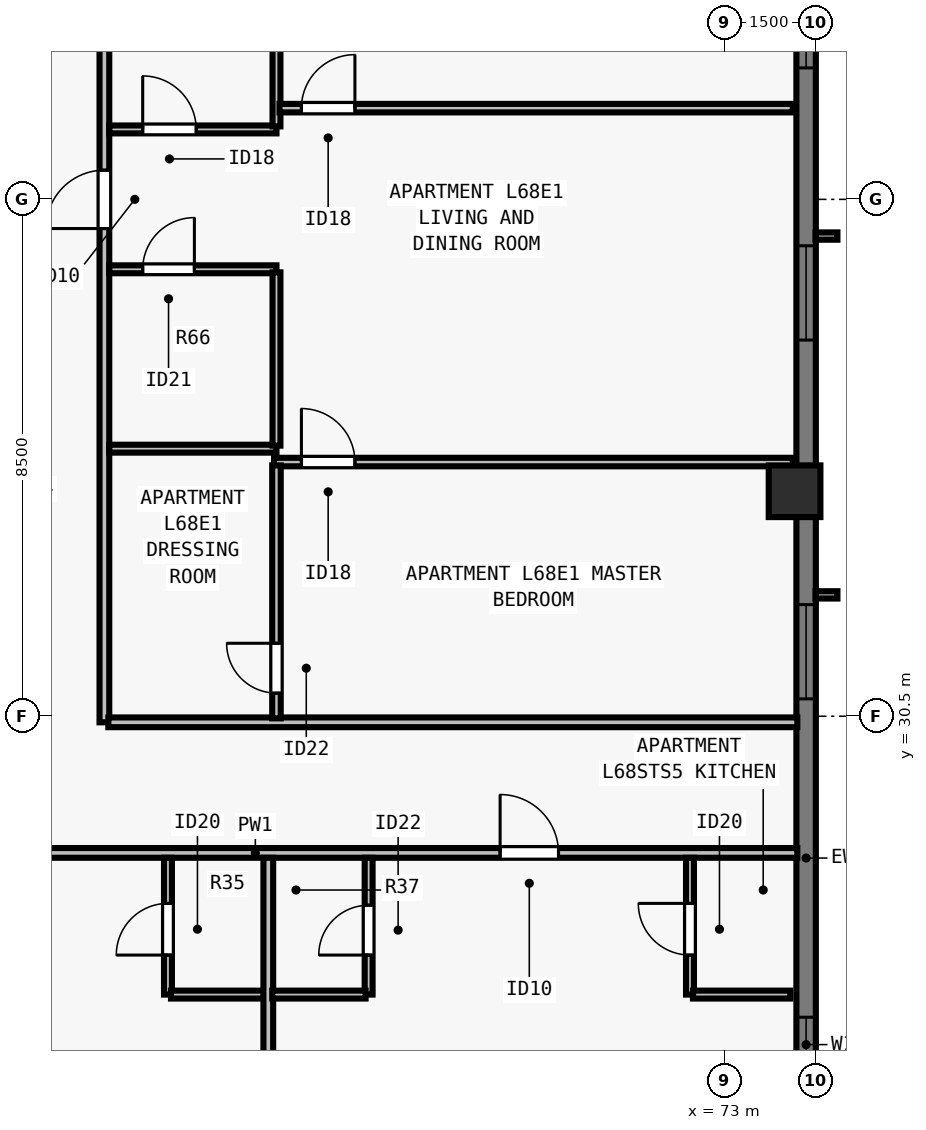
"""IFC4 building model, lengths in metres.
Left out: names, types, materials, properties, quantities, classifications, styles, units other than length and angle.
Written with IfcOpenShell. Run it as: python <this file> out.ifc"""

import sys

from ifc_helpers import new_model, si_unit, direction, frame, frame_2d, origin, origin_2d, place, context, subcontext, project, spatial, rectangle, extrude, element, fill, save


model = new_model("IFC4")
c1 = context("Model", 3, precision=1e-05, world=origin(), true_north=direction((0.0, 1.0)))
c2 = subcontext(c1, "Body", "Model", "MODEL_VIEW")
j1 = project(units=[si_unit("LENGTHUNIT", "METRE"), si_unit("PLANEANGLEUNIT", "RADIAN")], contexts=[c1])
p1 = place(None, origin())
s1 = spatial("IfcSite", under=j1, at=p1, CompositionType="ELEMENT")
p2 = place(p1, origin())
s2 = spatial("IfcBuilding", under=s1, at=p2, CompositionType="ELEMENT")
p3 = place(p2, frame((0.0, 0.0, 248.0)))
s3 = spatial("IfcBuildingStorey", under=s2, at=p3, CompositionType="ELEMENT", Elevation=248.0)
p4 = place(p3, frame((74.15, 34.2, 0.0), z_axis=(0.0, 0.0, 1.0), x_axis=(0.0, 1.0, 0.0)))
e1 = element("IfcColumn", 1, at=p4, inside=s3, PredefinedType="COLUMN", context=c2, shape_type="SweptSolid", body=[
    extrude(rectangle(XDim=0.85, YDim=0.85, at=origin_2d()), origin(), (0.0, 0.0, 1.0), 3.5),
])
p5 = place(p3, frame((74.34, 56.5, 0.0), z_axis=(0.0, 0.0, 1.0), x_axis=(0.0, -1.0, 0.0)))
e2 = element("IfcWall", 2, at=p5, inside=s3, PredefinedType="SOLIDWALL", context=c2, shape_type="SweptSolid", body=[
    extrude(rectangle(XDim=34.702, YDim=0.32, at=frame_2d((17.351, 0.0))), origin(), (0.0, 0.0, 1.0), 3.29),
])
p6 = place(p5, frame((4.763, 0.0, 0.8)))
e3 = element("IfcOpeningElement", 3, at=p6, cuts=e2, PredefinedType="OPENING", context=c2, shape_type="SweptSolid", body=[
    extrude(rectangle(XDim=1.55, YDim=1.678, at=frame_2d((0.775, 0.839))), frame((0.0, 0.17, 0.0), z_axis=(0.0, -1.0, 0.0), x_axis=(1.0, 0.0, 0.0)), (0.0, 0.0, 1.0), 0.34),
])
p7 = place(p5, frame((9.238, 0.0, 0.8)))
e4 = element("IfcOpeningElement", 4, at=p7, cuts=e2, PredefinedType="OPENING", context=c2, shape_type="SweptSolid", body=[
    extrude(rectangle(XDim=1.85, YDim=1.678, at=frame_2d((0.925, 0.839))), frame((0.0, 0.17, 0.0), z_axis=(0.0, -1.0, 0.0), x_axis=(1.0, 0.0, 0.0)), (0.0, 0.0, 1.0), 0.34),
])
p8 = place(p5, frame((13.488, 0.0, 0.8)))
e5 = element("IfcOpeningElement", 5, at=p8, cuts=e2, PredefinedType="OPENING", context=c2, shape_type="SweptSolid", body=[
    extrude(rectangle(XDim=1.85, YDim=1.678, at=frame_2d((0.925, 0.839))), frame((0.0, 0.17, 0.0), z_axis=(0.0, -1.0, 0.0), x_axis=(1.0, 0.0, 0.0)), (0.0, 0.0, 1.0), 0.34),
])
p9 = place(p5, frame((18.264, 0.0, 0.8)))
e6 = element("IfcOpeningElement", 6, at=p9, cuts=e2, PredefinedType="OPENING", context=c2, shape_type="SweptSolid", body=[
    extrude(rectangle(XDim=1.55, YDim=1.678, at=frame_2d((0.775, 0.839))), frame((0.0, 0.17, 0.0), z_axis=(0.0, -1.0, 0.0), x_axis=(1.0, 0.0, 0.0)), (0.0, 0.0, 1.0), 0.34),
])
p10 = place(p5, frame((24.164, 0.0, 0.8)))
e7 = element("IfcOpeningElement", 7, at=p10, cuts=e2, PredefinedType="OPENING", context=c2, shape_type="SweptSolid", body=[
    extrude(rectangle(XDim=1.55, YDim=1.678, at=frame_2d((0.775, 0.839))), frame((0.0, 0.17, 0.0), z_axis=(0.0, -1.0, 0.0), x_axis=(1.0, 0.0, 0.0)), (0.0, 0.0, 1.0), 0.34),
])
p11 = place(p5, frame((30.95, 0.0, 0.8)))
e8 = element("IfcOpeningElement", 8, at=p11, cuts=e2, PredefinedType="OPENING", context=c2, shape_type="SweptSolid", body=[
    extrude(rectangle(XDim=0.9, YDim=1.678, at=frame_2d((0.45, 0.839))), frame((0.0, 0.17, 0.0), z_axis=(0.0, -1.0, 0.0), x_axis=(1.0, 0.0, 0.0)), (0.0, 0.0, 1.0), 0.34),
])
p12 = place(p3, frame((29.915, 28.252, 0.0), z_axis=(0.0, 0.0, 1.0), x_axis=(1.0, 0.0, 0.0)))
e9 = element("IfcWall", 9, at=p12, inside=s3, PredefinedType="PARTITIONING", context=c2, shape_type="SweptSolid", body=[
    extrude(rectangle(XDim=44.28, YDim=0.16, at=frame_2d((22.14, 0.0))), origin(), (0.0, 0.0, 1.0), 2.958),
])
p13 = place(p12, frame((5.002, 0.0, 0.0)))
e10 = element("IfcOpeningElement", 10, at=p13, cuts=e9, PredefinedType="OPENING", context=c2, shape_type="SweptSolid", body=[
    extrude(rectangle(XDim=0.96, YDim=2.18, at=frame_2d((0.48, 1.09))), frame((0.0, 0.09, 0.0), z_axis=(0.0, -1.0, 0.0), x_axis=(1.0, 0.0, 0.0)), (0.0, 0.0, 1.0), 0.18),
])
p14 = place(p12, frame((12.718, 0.0, 0.0)))
e11 = element("IfcOpeningElement", 11, at=p14, cuts=e9, PredefinedType="OPENING", context=c2, shape_type="SweptSolid", body=[
    extrude(rectangle(XDim=0.96, YDim=2.18, at=frame_2d((0.48, 1.09))), frame((0.0, 0.09, 0.0), z_axis=(0.0, -1.0, 0.0), x_axis=(1.0, 0.0, 0.0)), (0.0, 0.0, 1.0), 0.18),
])
p15 = place(p12, frame((21.55, 0.0, 0.0)))
e12 = element("IfcOpeningElement", 12, at=p15, cuts=e9, PredefinedType="OPENING", context=c2, shape_type="SweptSolid", body=[
    extrude(rectangle(XDim=0.96, YDim=2.18, at=frame_2d((0.48, 1.09))), frame((0.0, 0.09, 0.0), z_axis=(0.0, -1.0, 0.0), x_axis=(1.0, 0.0, 0.0)), (0.0, 0.0, 1.0), 0.18),
])
p16 = place(p12, frame((30.382, 0.0, 0.0)))
e13 = element("IfcOpeningElement", 13, at=p16, cuts=e9, PredefinedType="OPENING", context=c2, shape_type="SweptSolid", body=[
    extrude(rectangle(XDim=0.96, YDim=2.18, at=frame_2d((0.48, 1.09))), frame((0.0, 0.09, 0.0), z_axis=(0.0, -1.0, 0.0), x_axis=(1.0, 0.0, 0.0)), (0.0, 0.0, 1.0), 0.18),
])
p17 = place(p12, frame((39.393, 0.0, 0.0)))
e14 = element("IfcOpeningElement", 14, at=p17, cuts=e9, PredefinedType="OPENING", context=c2, shape_type="SweptSolid", body=[
    extrude(rectangle(XDim=0.96, YDim=2.18, at=frame_2d((0.48, 1.09))), frame((0.0, 0.09, 0.0), z_axis=(0.0, -1.0, 0.0), x_axis=(1.0, 0.0, 0.0)), (0.0, 0.0, 1.0), 0.18),
])
p18 = place(p3, frame((62.8, 30.4, 0.0), z_axis=(0.0, 0.0, 1.0), x_axis=(0.0, 1.0, 0.0)))
e15 = element("IfcWall", 15, at=p18, inside=s3, PredefinedType="PARTITIONING", context=c2, shape_type="SweptSolid", body=[
    extrude(rectangle(XDim=17.2, YDim=0.16, at=frame_2d((8.6, 0.0))), origin(), (0.0, 0.0, 1.0), 3.29),
])
p19 = place(p18, frame((8.12, 0.0, 0.0)))
e16 = element("IfcOpeningElement", 16, at=p19, cuts=e15, PredefinedType="OPENING", context=c2, shape_type="SweptSolid", body=[
    extrude(rectangle(XDim=0.96, YDim=2.18, at=frame_2d((0.48, 1.09))), frame((0.0, 0.09, 0.0), z_axis=(0.0, -1.0, 0.0), x_axis=(1.0, 0.0, 0.0)), (0.0, 0.0, 1.0), 0.18),
])
p20 = place(p3, frame((62.865, 30.4, 0.0), z_axis=(0.0, 0.0, 1.0), x_axis=(1.0, 0.0, 0.0)))
e17 = element("IfcWall", 17, at=p20, inside=s3, PredefinedType="PARTITIONING", context=c2, shape_type="SweptSolid", body=[
    extrude(rectangle(XDim=11.33, YDim=0.16, at=frame_2d((5.665, 0.0))), origin(), (0.0, 0.0, 1.0), 3.29),
])
p21 = place(p3, frame((63.845, 25.923, 0.0), z_axis=(0.0, 0.0, 1.0), x_axis=(0.0, 1.0, 0.0)))
e18 = element("IfcWall", 18, at=p21, inside=s3, PredefinedType="PLUMBINGWALL", context=c2, shape_type="SweptSolid", body=[
    extrude(rectangle(XDim=2.25, YDim=0.13, at=frame_2d((1.125, 0.0))), origin(), (0.0, 0.0, 1.0), 3.29),
])
p22 = place(p21, frame((0.65, 0.0, 0.0)))
e19 = element("IfcOpeningElement", 19, at=p22, cuts=e18, PredefinedType="OPENING", context=c2, shape_type="SweptSolid", body=[
    extrude(rectangle(XDim=0.85, YDim=2.1, at=frame_2d((0.425, 1.05))), frame((0.0, 0.075, 0.0), z_axis=(0.0, -1.0, 0.0), x_axis=(1.0, 0.0, 0.0)), (0.0, 0.0, 1.0), 0.15),
])
p23 = place(p3, frame((63.896, 25.923, 0.0), z_axis=(0.0, 0.0, 1.0), x_axis=(1.0, 0.0, 0.0)))
e20 = element("IfcWall", 20, at=p23, inside=s3, PredefinedType="PLUMBINGWALL", context=c2, shape_type="SweptSolid", body=[
    extrude(rectangle(XDim=1.6, YDim=0.13, at=frame_2d((0.8, 0.0))), origin(), (0.0, 0.0, 1.0), 3.29),
])
p24 = place(p3, frame((65.496, 16.805, 0.0), z_axis=(0.0, 0.0, 1.0), x_axis=(0.0, 1.0, 0.0)))
e21 = element("IfcWall", 21, at=p24, inside=s3, PredefinedType="PARTITIONING", context=c2, shape_type="SweptSolid", body=[
    extrude(rectangle(XDim=11.368, YDim=0.16, at=frame_2d((5.684, 0.0))), origin(), (0.0, 0.0, 1.0), 2.573),
])
p25 = place(p3, frame((67.146, 25.923, 0.0), z_axis=(0.0, 0.0, 1.0), x_axis=(0.0, 1.0, 0.0)))
e22 = element("IfcWall", 22, at=p25, inside=s3, PredefinedType="PLUMBINGWALL", context=c2, shape_type="SweptSolid", body=[
    extrude(rectangle(XDim=2.25, YDim=0.13, at=frame_2d((1.125, 0.0))), origin(), (0.0, 0.0, 1.0), 3.29),
])
p26 = place(p25, frame((0.65, 0.0, 0.0)))
e23 = element("IfcOpeningElement", 23, at=p26, cuts=e22, PredefinedType="OPENING", context=c2, shape_type="SweptSolid", body=[
    extrude(rectangle(XDim=0.82, YDim=2.1, at=frame_2d((0.41, 1.05))), frame((0.0, 0.075, 0.0), z_axis=(0.0, -1.0, 0.0), x_axis=(1.0, 0.0, 0.0)), (0.0, 0.0, 1.0), 0.15),
])
p27 = place(p3, frame((65.561, 25.923, 0.0), z_axis=(0.0, 0.0, 1.0), x_axis=(1.0, 0.0, 0.0)))
e24 = element("IfcWall", 24, at=p27, inside=s3, PredefinedType="PLUMBINGWALL", context=c2, shape_type="SweptSolid", body=[
    extrude(rectangle(XDim=1.535, YDim=0.13, at=frame_2d((0.768, 0.0))), origin(), (0.0, 0.0, 1.0), 3.29),
])
p28 = place(p3, frame((72.43, 25.923, 0.0), z_axis=(0.0, 0.0, 1.0), x_axis=(0.0, 1.0, 0.0)))
e25 = element("IfcWall", 25, at=p28, inside=s3, PredefinedType="PLUMBINGWALL", context=c2, shape_type="SweptSolid", body=[
    extrude(rectangle(XDim=2.25, YDim=0.13, at=frame_2d((1.125, 0.0))), origin(), (0.0, 0.0, 1.0), 3.29),
])
p29 = place(p28, frame((0.65, 0.0, 0.0)))
e26 = element("IfcOpeningElement", 26, at=p29, cuts=e25, PredefinedType="OPENING", context=c2, shape_type="SweptSolid", body=[
    extrude(rectangle(XDim=0.85, YDim=2.1, at=frame_2d((0.425, 1.05))), frame((0.0, 0.075, 0.0), z_axis=(0.0, -1.0, 0.0), x_axis=(1.0, 0.0, 0.0)), (0.0, 0.0, 1.0), 0.15),
])
p30 = place(p3, frame((72.48, 25.923, 0.0), z_axis=(0.0, 0.0, 1.0), x_axis=(1.0, 0.0, 0.0)))
e27 = element("IfcWall", 27, at=p30, inside=s3, PredefinedType="PLUMBINGWALL", context=c2, shape_type="SweptSolid", body=[
    extrude(rectangle(XDim=1.6, YDim=0.13, at=frame_2d((0.8, 0.0))), origin(), (0.0, 0.0, 1.0), 3.29),
])
p31 = place(p3, frame((62.88, 34.9, 0.0), z_axis=(0.0, 0.0, 1.0), x_axis=(1.0, 0.0, 0.0)))
e28 = element("IfcWall", 28, at=p31, inside=s3, PredefinedType="PLUMBINGWALL", context=c2, shape_type="SweptSolid", body=[
    extrude(rectangle(XDim=2.75, YDim=0.13, at=frame_2d((1.375, 0.0))), origin(), (0.0, 0.0, 1.0), 3.29),
])
p32 = place(p3, frame((62.88, 37.85, 0.0), z_axis=(0.0, 0.0, 1.0), x_axis=(1.0, 0.0, 0.0)))
e29 = element("IfcWall", 29, at=p32, inside=s3, PredefinedType="PLUMBINGWALL", context=c2, shape_type="SweptSolid", body=[
    extrude(rectangle(XDim=2.75, YDim=0.13, at=frame_2d((1.375, 0.0))), origin(), (0.0, 0.0, 1.0), 3.29),
])
p33 = place(p32, frame((0.55, 0.0, 0.0)))
e30 = element("IfcOpeningElement", 30, at=p33, cuts=e29, PredefinedType="OPENING", context=c2, shape_type="SweptSolid", body=[
    extrude(rectangle(XDim=0.85, YDim=2.08, at=frame_2d((0.425, 1.04))), frame((0.0, 0.075, 0.0), z_axis=(0.0, -1.0, 0.0), x_axis=(1.0, 0.0, 0.0)), (0.0, 0.0, 1.0), 0.15),
])
p34 = place(p3, frame((65.63, 34.95, 0.0), z_axis=(0.0, 0.0, 1.0), x_axis=(0.0, 1.0, 0.0)))
e31 = element("IfcWall", 31, at=p34, inside=s3, PredefinedType="PLUMBINGWALL", context=c2, shape_type="SweptSolid", body=[
    extrude(rectangle(XDim=2.85, YDim=0.13, at=frame_2d((1.425, 0.0))), origin(), (0.0, 0.0, 1.0), 3.29),
])
p35 = place(p3, frame((62.88, 40.15, 0.0), z_axis=(0.0, 0.0, 1.0), x_axis=(1.0, 0.0, 0.0)))
e32 = element("IfcWall", 32, at=p35, inside=s3, PredefinedType="PLUMBINGWALL", context=c2, shape_type="SweptSolid", body=[
    extrude(rectangle(XDim=2.75, YDim=0.13, at=frame_2d((1.375, 0.0))), origin(), (0.0, 0.0, 1.0), 3.29),
])
p36 = place(p35, frame((0.55, 0.0, 0.0)))
e33 = element("IfcOpeningElement", 33, at=p36, cuts=e32, PredefinedType="OPENING", context=c2, shape_type="SweptSolid", body=[
    extrude(rectangle(XDim=0.88, YDim=2.1, at=frame_2d((0.44, 1.05))), frame((0.0, 0.075, 0.0), z_axis=(0.0, -1.0, 0.0), x_axis=(1.0, 0.0, 0.0)), (0.0, 0.0, 1.0), 0.15),
])
p37 = place(p3, frame((65.63, 40.2, 0.0), z_axis=(0.0, 0.0, 1.0), x_axis=(0.0, 1.0, 0.0)))
e34 = element("IfcWall", 34, at=p37, inside=s3, PredefinedType="PLUMBINGWALL", context=c2, shape_type="SweptSolid", body=[
    extrude(rectangle(XDim=3.15, YDim=0.13, at=frame_2d((1.575, 0.0))), origin(), (0.0, 0.0, 1.0), 3.29),
])
p38 = place(p3, frame((65.59, 34.68, 0.0), z_axis=(0.0, 0.0, 1.0), x_axis=(1.0, 0.0, 0.0)))
e35 = element("IfcWall", 35, at=p38, inside=s3, PredefinedType="PARTITIONING", context=c2, shape_type="SweptSolid", body=[
    extrude(rectangle(XDim=8.53, YDim=0.14, at=frame_2d((4.265, 0.0))), origin(), (0.0, 0.0, 1.0), 3.29),
])
p39 = place(p38, frame((0.45, 0.0, 0.0)))
e36 = element("IfcOpeningElement", 36, at=p39, cuts=e35, PredefinedType="OPENING", context=c2, shape_type="SweptSolid", body=[
    extrude(rectangle(XDim=0.88, YDim=2.1, at=frame_2d((0.44, 1.05))), frame((0.0, 0.08, 0.0), z_axis=(0.0, -1.0, 0.0), x_axis=(1.0, 0.0, 0.0)), (0.0, 0.0, 1.0), 0.16),
])
p40 = place(p3, frame((65.63, 30.465, 0.0), z_axis=(0.0, 0.0, 1.0), x_axis=(0.0, 1.0, 0.0)))
e37 = element("IfcWall", 37, at=p40, inside=s3, PredefinedType="PARTITIONING", context=c2, shape_type="SweptSolid", body=[
    extrude(rectangle(XDim=4.16, YDim=0.14, at=frame_2d((2.08, 0.0))), origin(), (0.0, 0.0, 1.0), 3.29),
])
p41 = place(p40, frame((0.415, 0.0, 0.0)))
e38 = element("IfcOpeningElement", 38, at=p41, cuts=e37, PredefinedType="OPENING", context=c2, shape_type="SweptSolid", body=[
    extrude(rectangle(XDim=0.82, YDim=2.1, at=frame_2d((0.41, 1.05))), frame((0.0, 0.08, 0.0), z_axis=(0.0, -1.0, 0.0), x_axis=(1.0, 0.0, 0.0)), (0.0, 0.0, 1.0), 0.16),
])
p42 = place(p3, frame((65.68, 40.5, 0.0), z_axis=(0.0, 0.0, 1.0), x_axis=(1.0, 0.0, 0.0)))
e39 = element("IfcWall", 39, at=p42, inside=s3, PredefinedType="PARTITIONING", context=c2, shape_type="SweptSolid", body=[
    extrude(rectangle(XDim=8.44, YDim=0.14, at=frame_2d((4.22, 0.0))), origin(), (0.0, 0.0, 1.0), 3.29),
])
p43 = place(p42, frame((0.36, 0.0, 0.0)))
e40 = element("IfcOpeningElement", 40, at=p43, cuts=e39, PredefinedType="OPENING", context=c2, shape_type="SweptSolid", body=[
    extrude(rectangle(XDim=0.88, YDim=2.1, at=frame_2d((0.44, 1.05))), frame((0.0, 0.08, 0.0), z_axis=(0.0, -1.0, 0.0), x_axis=(1.0, 0.0, 0.0)), (0.0, 0.0, 1.0), 0.16),
])
p44 = place(p8, origin())
e41 = element("IfcWindow", 41, at=p44, inside=s3, PartitioningType="SINGLE_PANEL", PredefinedType="WINDOW", context=c2, shape_type="SweptSolid", body=[
    extrude(rectangle(XDim=1.85, YDim=1.678, at=frame_2d((0.925, 0.839))), frame((0.0, -0.05, 0.0), z_axis=(0.0, -1.0, 0.0), x_axis=(1.0, 0.0, 0.0)), (0.0, 0.0, 1.0), 0.06),
])
fill(e5, e41)
p45 = place(p9, origin())
e42 = element("IfcWindow", 42, at=p45, inside=s3, PartitioningType="SINGLE_PANEL", PredefinedType="WINDOW", context=c2, shape_type="SweptSolid", body=[
    extrude(rectangle(XDim=1.55, YDim=1.678, at=frame_2d((0.775, 0.839))), frame((0.0, -0.05, 0.0), z_axis=(0.0, -1.0, 0.0), x_axis=(1.0, 0.0, 0.0)), (0.0, 0.0, 1.0), 0.06),
])
fill(e6, e42)
p46 = place(p10, origin())
e43 = element("IfcWindow", 43, at=p46, inside=s3, PartitioningType="SINGLE_PANEL", PredefinedType="WINDOW", context=c2, shape_type="SweptSolid", body=[
    extrude(rectangle(XDim=1.55, YDim=1.678, at=frame_2d((0.775, 0.839))), frame((0.0, -0.05, 0.0), z_axis=(0.0, -1.0, 0.0), x_axis=(1.0, 0.0, 0.0)), (0.0, 0.0, 1.0), 0.06),
])
fill(e7, e43)
p47 = place(p11, origin())
e44 = element("IfcWindow", 44, at=p47, inside=s3, PartitioningType="SINGLE_PANEL", PredefinedType="WINDOW", context=c2, shape_type="SweptSolid", body=[
    extrude(rectangle(XDim=0.9, YDim=1.678, at=frame_2d((0.45, 0.839))), frame((0.0, -0.04, 0.0), z_axis=(0.0, -1.0, 0.0), x_axis=(1.0, 0.0, 0.0)), (0.0, 0.0, 1.0), 0.06),
])
fill(e8, e44)
p48 = place(p22, origin())
e45 = element("IfcDoor", 45, at=p48, inside=s3, OperationType="SINGLE_SWING_LEFT", PredefinedType="DOOR", context=c2, shape_type="SweptSolid", body=[
    extrude(rectangle(XDim=0.85, YDim=2.1, at=frame_2d((0.425, 1.05))), frame((0.0, 0.025, 0.0), z_axis=(0.0, -1.0, 0.0), x_axis=(1.0, 0.0, 0.0)), (0.0, 0.0, 1.0), 0.05),
])
fill(e19, e45)
p49 = place(p26, origin())
e46 = element("IfcDoor", 46, at=p49, inside=s3, OperationType="SINGLE_SWING_LEFT", PredefinedType="DOOR", context=c2, shape_type="SweptSolid", body=[
    extrude(rectangle(XDim=0.82, YDim=2.1, at=frame_2d((0.41, 1.05))), frame((0.0, 0.025, 0.0), z_axis=(0.0, -1.0, 0.0), x_axis=(1.0, 0.0, 0.0)), (0.0, 0.0, 1.0), 0.05),
])
fill(e23, e46)
p50 = place(p29, origin())
e47 = element("IfcDoor", 47, at=p50, inside=s3, OperationType="SINGLE_SWING_RIGHT", PredefinedType="DOOR", context=c2, shape_type="SweptSolid", body=[
    extrude(rectangle(XDim=0.85, YDim=2.1, at=frame_2d((0.425, 1.05))), frame((0.0, 0.025, 0.0), z_axis=(0.0, -1.0, 0.0), x_axis=(1.0, 0.0, 0.0)), (0.0, 0.0, 1.0), 0.05),
])
fill(e26, e47)
p51 = place(p17, origin())
e48 = element("IfcDoor", 48, at=p51, inside=s3, OperationType="SINGLE_SWING_LEFT", PredefinedType="DOOR", context=c2, shape_type="SweptSolid", body=[
    extrude(rectangle(XDim=0.96, YDim=2.18, at=frame_2d((0.48, 1.09))), frame((0.0, 0.025, 0.0), z_axis=(0.0, -1.0, 0.0), x_axis=(1.0, 0.0, 0.0)), (0.0, 0.0, 1.0), 0.05),
])
fill(e14, e48)
p52 = place(p33, origin())
e49 = element("IfcDoor", 49, at=p52, inside=s3, OperationType="SINGLE_SWING_RIGHT", PredefinedType="DOOR", context=c2, shape_type="SweptSolid", body=[
    extrude(rectangle(XDim=0.85, YDim=2.08, at=frame_2d((0.425, 1.04))), frame((0.0, 0.025, 0.0), z_axis=(0.0, -1.0, 0.0), x_axis=(1.0, 0.0, 0.0)), (0.0, 0.0, 1.0), 0.05),
])
fill(e30, e49)
p53 = place(p36, origin())
e50 = element("IfcDoor", 50, at=p53, inside=s3, OperationType="SINGLE_SWING_LEFT", PredefinedType="DOOR", context=c2, shape_type="SweptSolid", body=[
    extrude(rectangle(XDim=0.88, YDim=2.1, at=frame_2d((0.44, 1.05))), frame((0.0, 0.025, 0.0), z_axis=(0.0, -1.0, 0.0), x_axis=(1.0, 0.0, 0.0)), (0.0, 0.0, 1.0), 0.05),
])
fill(e33, e50)
p54 = place(p41, origin())
e51 = element("IfcDoor", 51, at=p54, inside=s3, OperationType="SINGLE_SWING_RIGHT", PredefinedType="DOOR", context=c2, shape_type="SweptSolid", body=[
    extrude(rectangle(XDim=0.82, YDim=2.1, at=frame_2d((0.41, 1.05))), frame((0.0, 0.025, 0.0), z_axis=(0.0, -1.0, 0.0), x_axis=(1.0, 0.0, 0.0)), (0.0, 0.0, 1.0), 0.05),
])
fill(e38, e51)
p55 = place(p39, origin())
e52 = element("IfcDoor", 52, at=p55, inside=s3, OperationType="SINGLE_SWING_LEFT", PredefinedType="DOOR", context=c2, shape_type="SweptSolid", body=[
    extrude(rectangle(XDim=0.88, YDim=2.1, at=frame_2d((0.44, 1.05))), frame((0.0, 0.025, 0.0), z_axis=(0.0, -1.0, 0.0), x_axis=(1.0, 0.0, 0.0)), (0.0, 0.0, 1.0), 0.05),
])
fill(e36, e52)
p56 = place(p43, origin())
e53 = element("IfcDoor", 53, at=p56, inside=s3, OperationType="SINGLE_SWING_RIGHT", PredefinedType="DOOR", context=c2, shape_type="SweptSolid", body=[
    extrude(rectangle(XDim=0.88, YDim=2.1, at=frame_2d((0.44, 1.05))), frame((0.0, 0.025, 0.0), z_axis=(0.0, -1.0, 0.0), x_axis=(1.0, 0.0, 0.0)), (0.0, 0.0, 1.0), 0.05),
])
fill(e40, e53)
p57 = place(p19, origin())
e54 = element("IfcDoor", 54, at=p57, inside=s3, OperationType="SINGLE_SWING_LEFT", PredefinedType="DOOR", context=c2, shape_type="SweptSolid", body=[
    extrude(rectangle(XDim=0.96, YDim=2.18, at=frame_2d((0.48, 1.09))), frame((0.0, 0.025, 0.0), z_axis=(0.0, -1.0, 0.0), x_axis=(1.0, 0.0, 0.0)), (0.0, 0.0, 1.0), 0.05),
])
fill(e16, e54)
save(model, sys.argv[1])
